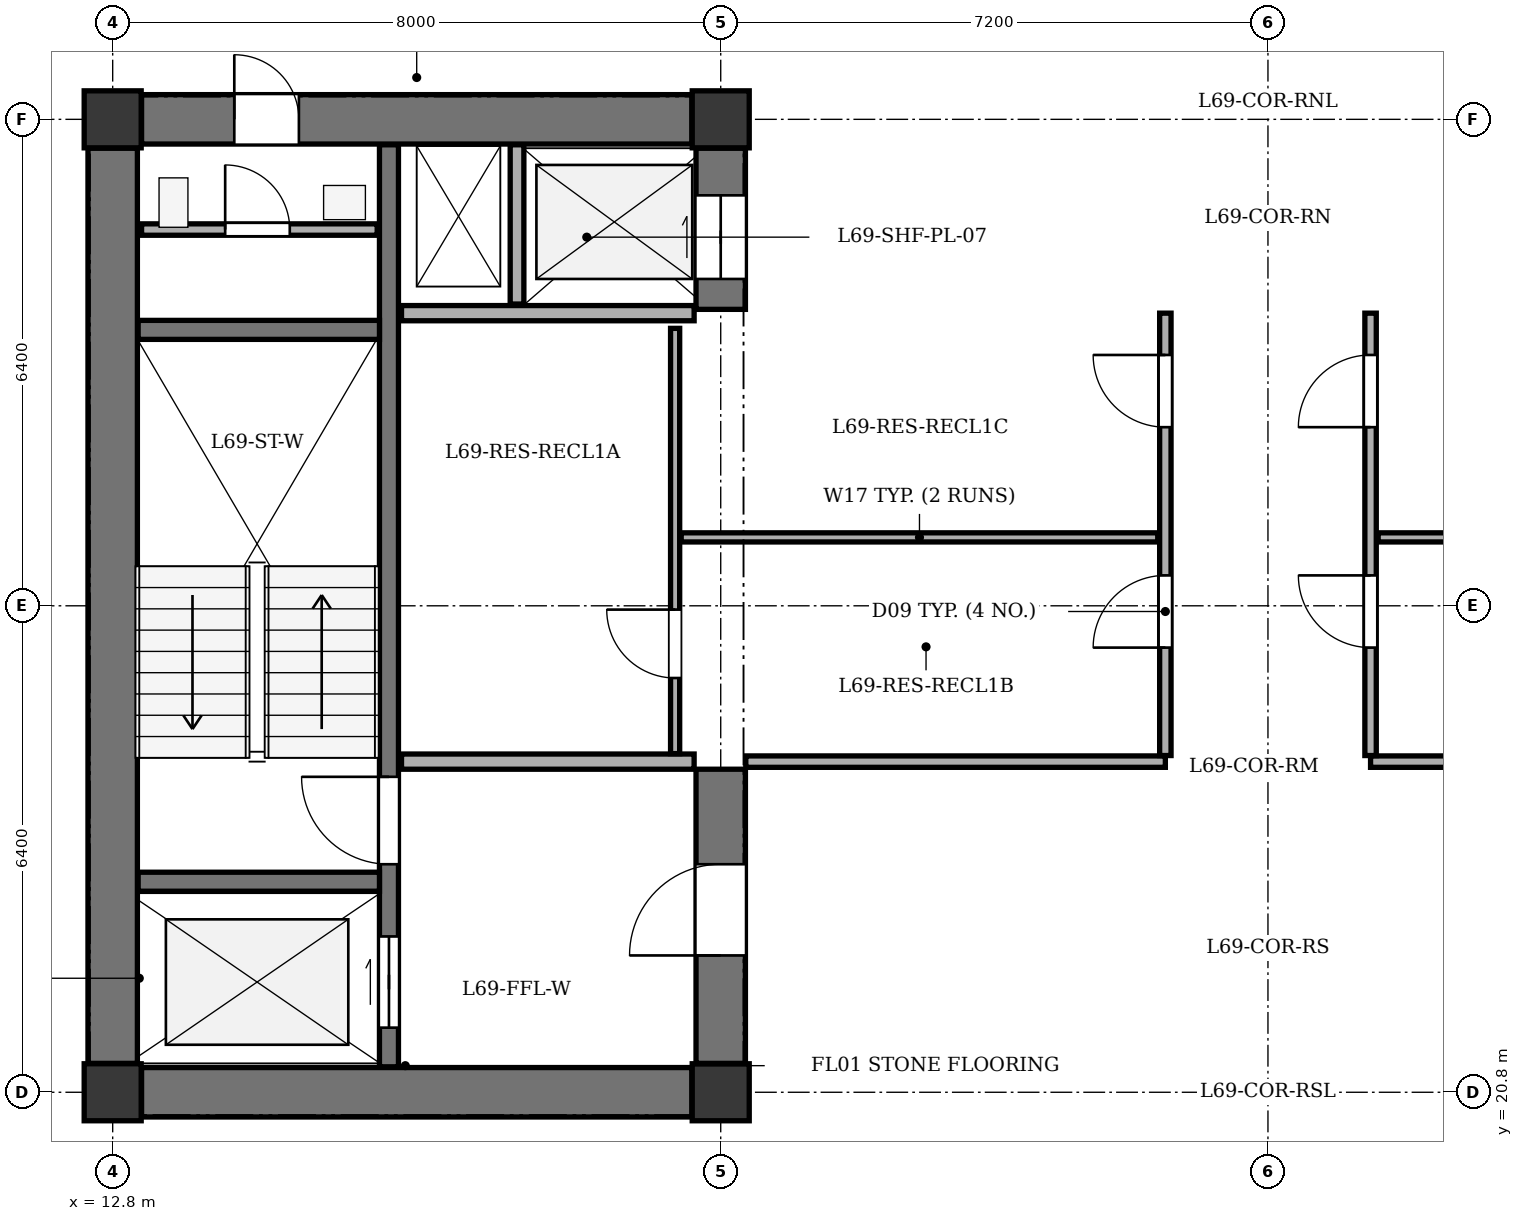
"""IFC4 building model, lengths in metres.
Left out: names, types, materials, properties, quantities, classifications, styles, units other than length and angle.
Written with IfcOpenShell. Run it as: python <this file> out.ifc"""

import sys

from ifc_helpers import new_model, si_unit, direction, frame, frame_2d, origin, origin_2d, place, context, subcontext, project, spatial, rectangle, extrude, element, fill, save


model = new_model("IFC4")
c1 = context("Model", 3, precision=1e-05, world=origin(), true_north=direction((0.0, 1.0)))
c2 = subcontext(c1, "Body", "Model", "MODEL_VIEW")
j1 = project(units=[si_unit("LENGTHUNIT", "METRE"), si_unit("PLANEANGLEUNIT", "RADIAN")], contexts=[c1])
p1 = place(None, origin())
s1 = spatial("IfcSite", under=j1, at=p1, CompositionType="ELEMENT")
p2 = place(p1, origin())
s2 = spatial("IfcBuilding", under=s1, at=p2, CompositionType="ELEMENT")
p3 = place(p2, frame((0.0, 0.0, 261.9)))
s3 = spatial("IfcBuildingStorey", under=s2, at=p3, CompositionType="ELEMENT", Elevation=261.9)
for number, where, z_axis, x_axis in (
    (1, (12.8, 20.8, 0.0), (0.0, 0.0, 1.0), (1.0, 0.0, 0.0)),
    (2, (20.8, 20.8, 0.0), (0.0, 0.0, 1.0), (1.0, 0.0, 0.0)),
    (3, (12.8, 33.6, 0.0), (0.0, 0.0, 1.0), (1.0, 0.0, 0.0)),
    (4, (20.8, 33.6, 0.0), (0.0, 0.0, 1.0), (1.0, 0.0, 0.0)),
):
    element("IfcColumn", number, at=place(p3, frame(where, z_axis=z_axis, x_axis=x_axis)), inside=s3, PredefinedType="COLUMN", context=c2, shape_type="SweptSolid", body=[
        extrude(rectangle(XDim=0.75, YDim=0.75, at=origin_2d()), origin(), (0.0, 0.0, 1.0), 3.4),
    ])
p4 = place(p3, frame((12.8, 21.18, 0.0), z_axis=(0.0, 0.0, 1.0), x_axis=(0.0, 1.0, 0.0)))
e5 = element("IfcWall", 5, at=p4, inside=s3, PredefinedType="SHEAR", context=c2, shape_type="SweptSolid", body=[
    extrude(rectangle(XDim=12.04, YDim=0.65, at=frame_2d((6.02, 0.0))), origin(), (0.0, 0.0, 1.0), 3.1),
])
p5 = place(p3, frame((13.18, 20.8, 0.0), z_axis=(0.0, 0.0, 1.0), x_axis=(1.0, 0.0, 0.0)))
e6 = element("IfcWall", 6, at=p5, inside=s3, PredefinedType="SHEAR", context=c2, shape_type="SweptSolid", body=[
    extrude(rectangle(XDim=7.24, YDim=0.65, at=frame_2d((3.62, 0.0))), origin(), (0.0, 0.0, 1.0), 3.1),
])
p6 = place(p3, frame((13.18, 33.6, 0.0), z_axis=(0.0, 0.0, 1.0), x_axis=(1.0, 0.0, 0.0)))
e7 = element("IfcWall", 7, at=p6, inside=s3, PredefinedType="SHEAR", context=c2, shape_type="SweptSolid", body=[
    extrude(rectangle(XDim=7.24, YDim=0.65, at=frame_2d((3.62, 0.0))), origin(), (0.0, 0.0, 1.0), 3.1),
])
p7 = place(p6, frame((1.22, 0.0, 0.0)))
e8 = element("IfcOpeningElement", 8, at=p7, cuts=e7, PredefinedType="OPENING", context=c2, shape_type="SweptSolid", body=[
    extrude(rectangle(XDim=0.85, YDim=2.02, at=frame_2d((0.425, 1.01))), frame((0.0, 0.335, 0.0), z_axis=(0.0, -1.0, 0.0), x_axis=(1.0, 0.0, 0.0)), (0.0, 0.0, 1.0), 0.67),
])
p8 = place(p3, frame((20.8, 21.18, 0.0), z_axis=(0.0, 0.0, 1.0), x_axis=(0.0, 1.0, 0.0)))
e9 = element("IfcWall", 9, at=p8, inside=s3, PredefinedType="SHEAR", context=c2, shape_type="SweptSolid", body=[
    extrude(rectangle(XDim=3.87, YDim=0.65, at=frame_2d((1.935, 0.0))), origin(), (0.0, 0.0, 1.0), 3.1),
])
p9 = place(p8, frame((1.42, 0.0, 0.0)))
e10 = element("IfcOpeningElement", 10, at=p9, cuts=e9, PredefinedType="OPENING", context=c2, shape_type="SweptSolid", body=[
    extrude(rectangle(XDim=1.2, YDim=2.15, at=frame_2d((0.6, 1.075))), frame((0.0, 0.335, 0.0), z_axis=(0.0, -1.0, 0.0), x_axis=(1.0, 0.0, 0.0)), (0.0, 0.0, 1.0), 0.67),
])
p10 = place(p3, frame((20.8, 31.1, 0.0), z_axis=(0.0, 0.0, 1.0), x_axis=(0.0, 1.0, 0.0)))
e11 = element("IfcWall", 11, at=p10, inside=s3, PredefinedType="SHEAR", context=c2, shape_type="SweptSolid", body=[
    extrude(rectangle(XDim=2.12, YDim=0.65, at=frame_2d((1.06, 0.0))), origin(), (0.0, 0.0, 1.0), 3.1),
])
p11 = place(p10, frame((0.4, 0.0, 0.0)))
e12 = element("IfcOpeningElement", 12, at=p11, cuts=e11, PredefinedType="OPENING", context=c2, shape_type="SweptSolid", body=[
    extrude(rectangle(XDim=1.1, YDim=2.1, at=frame_2d((0.55, 1.05))), frame((0.0, 0.335, 0.0), z_axis=(0.0, -1.0, 0.0), x_axis=(1.0, 0.0, 0.0)), (0.0, 0.0, 1.0), 0.67),
])
p12 = place(p3, frame((16.435, 21.135, 0.0), z_axis=(0.0, 0.0, 1.0), x_axis=(0.0, 1.0, 0.0)))
e13 = element("IfcWall", 13, at=p12, inside=s3, PredefinedType="SHEAR", context=c2, shape_type="SweptSolid", body=[
    extrude(rectangle(XDim=12.13, YDim=0.25, at=frame_2d((6.065, 0.0))), origin(), (0.0, 0.0, 1.0), 3.1),
])
p13 = place(p12, frame((0.515, 0.0, 0.0)))
e14 = element("IfcOpeningElement", 14, at=p13, cuts=e13, PredefinedType="OPENING", context=c2, shape_type="SweptSolid", body=[
    extrude(rectangle(XDim=1.2, YDim=2.15, at=frame_2d((0.6, 1.075))), frame((0.0, 0.135, 0.0), z_axis=(0.0, -1.0, 0.0), x_axis=(1.0, 0.0, 0.0)), (0.0, 0.0, 1.0), 0.27),
])
p14 = place(p12, frame((2.665, 0.0, 0.0)))
e15 = element("IfcOpeningElement", 15, at=p14, cuts=e13, PredefinedType="OPENING", context=c2, shape_type="SweptSolid", body=[
    extrude(rectangle(XDim=1.15, YDim=2.15, at=frame_2d((0.575, 1.075))), frame((0.0, 0.135, 0.0), z_axis=(0.0, -1.0, 0.0), x_axis=(1.0, 0.0, 0.0)), (0.0, 0.0, 1.0), 0.27),
])
for number, where, z_axis, x_axis in (
    (16, (13.135, 23.57, 0.0), (0.0, 0.0, 1.0), (1.0, 0.0, 0.0)),
    (17, (13.135, 30.83, 0.0), (0.0, 0.0, 1.0), (1.0, 0.0, 0.0)),
):
    element("IfcWall", number, at=place(p3, frame(where, z_axis=z_axis, x_axis=x_axis)), inside=s3, PredefinedType="SHEAR", context=c2, shape_type="SweptSolid", body=[
        extrude(rectangle(XDim=3.175, YDim=0.25, at=frame_2d((1.587, 0.0))), origin(), (0.0, 0.0, 1.0), 3.1),
    ])
for number, where, z_axis, x_axis in (
    (18, (16.6, 25.15, 0.0), (0.0, 0.0, 1.0), (1.0, 0.0, 0.0)),
    (19, (16.6, 31.05, 0.0), (0.0, 0.0, 1.0), (1.0, 0.0, 0.0)),
):
    element("IfcWall", number, at=place(p3, frame(where, z_axis=z_axis, x_axis=x_axis)), inside=s3, PredefinedType="SOLIDWALL", context=c2, shape_type="SweptSolid", body=[
        extrude(rectangle(XDim=3.85, YDim=0.2, at=frame_2d((1.925, 0.0))), origin(), (0.0, 0.0, 1.0), 3.1),
    ])
p15 = place(p3, frame((18.12, 31.17, 0.0), z_axis=(0.0, 0.0, 1.0), x_axis=(0.0, 1.0, 0.0)))
e20 = element("IfcWall", 20, at=p15, inside=s3, PredefinedType="PARTITIONING", context=c2, shape_type="SweptSolid", body=[
    extrude(rectangle(XDim=2.095, YDim=0.18, at=frame_2d((1.047, 0.0))), origin(), (0.0, 0.0, 1.0), 3.1),
])
p16 = place(p3, frame((13.18, 32.15, 0.0), z_axis=(0.0, 0.0, 1.0), x_axis=(1.0, 0.0, 0.0)))
e21 = element("IfcWall", 21, at=p16, inside=s3, PredefinedType="PARTITIONING", context=c2, shape_type="SweptSolid", body=[
    extrude(rectangle(XDim=3.1, YDim=0.15, at=frame_2d((1.55, 0.0))), origin(), (0.0, 0.0, 1.0), 3.1),
])
p17 = place(p16, frame((1.1, 0.0, 0.0)))
e22 = element("IfcOpeningElement", 22, at=p17, cuts=e21, PredefinedType="OPENING", context=c2, shape_type="SweptSolid", body=[
    extrude(rectangle(XDim=0.85, YDim=2.02, at=frame_2d((0.425, 1.01))), frame((0.0, 0.085, 0.0), z_axis=(0.0, -1.0, 0.0), x_axis=(1.0, 0.0, 0.0)), (0.0, 0.0, 1.0), 0.17),
])
for number, where, z_axis, x_axis in (
    (23, (21.13, 25.15, 0.0), (0.0, 0.0, 1.0), (1.0, 0.0, 0.0)),
    (24, (29.35, 25.15, 0.0), (0.0, 0.0, 1.0), (1.0, 0.0, 0.0)),
):
    element("IfcWall", number, at=place(p3, frame(where, z_axis=z_axis, x_axis=x_axis)), inside=s3, PredefinedType="PARTITIONING", context=c2, shape_type="SweptSolid", body=[
        extrude(rectangle(XDim=5.52, YDim=0.15, at=frame_2d((2.76, 0.0))), origin(), (0.0, 0.0, 1.0), 3.1),
    ])
p18 = place(p3, frame((26.65, 25.23, 0.0), z_axis=(0.0, 0.0, 1.0), x_axis=(0.0, 1.0, 0.0)))
e25 = element("IfcWall", 25, at=p18, inside=s3, PredefinedType="PARTITIONING", context=c2, shape_type="SweptSolid", body=[
    extrude(rectangle(XDim=5.82, YDim=0.15, at=frame_2d((2.91, 0.0))), origin(), (0.0, 0.0, 1.0), 3.1),
])
p19 = place(p18, frame((1.42, 0.0, 0.0)))
e26 = element("IfcOpeningElement", 26, at=p19, cuts=e25, PredefinedType="OPENING", context=c2, shape_type="SweptSolid", body=[
    extrude(rectangle(XDim=0.95, YDim=2.1, at=frame_2d((0.475, 1.05))), frame((0.0, 0.085, 0.0), z_axis=(0.0, -1.0, 0.0), x_axis=(1.0, 0.0, 0.0)), (0.0, 0.0, 1.0), 0.17),
])
p20 = place(p18, frame((4.32, 0.0, 0.0)))
e27 = element("IfcOpeningElement", 27, at=p20, cuts=e25, PredefinedType="OPENING", context=c2, shape_type="SweptSolid", body=[
    extrude(rectangle(XDim=0.95, YDim=2.1, at=frame_2d((0.475, 1.05))), frame((0.0, 0.085, 0.0), z_axis=(0.0, -1.0, 0.0), x_axis=(1.0, 0.0, 0.0)), (0.0, 0.0, 1.0), 0.17),
])
p21 = place(p3, frame((20.2, 25.255, 0.0), z_axis=(0.0, 0.0, 1.0), x_axis=(0.0, 1.0, 0.0)))
e28 = element("IfcWall", 28, at=p21, inside=s3, PredefinedType="PARTITIONING", context=c2, shape_type="SweptSolid", body=[
    extrude(rectangle(XDim=5.595, YDim=0.12, at=frame_2d((2.798, 0.0))), origin(), (0.0, 0.0, 1.0), 3.1),
])
p22 = place(p21, frame((0.995, 0.0, 0.0)))
e29 = element("IfcOpeningElement", 29, at=p22, cuts=e28, PredefinedType="OPENING", context=c2, shape_type="SweptSolid", body=[
    extrude(rectangle(XDim=0.9, YDim=2.05, at=frame_2d((0.45, 1.025))), frame((0.0, 0.07, 0.0), z_axis=(0.0, -1.0, 0.0), x_axis=(1.0, 0.0, 0.0)), (0.0, 0.0, 1.0), 0.14),
])
p23 = place(p3, frame((20.28, 28.1, 0.0), z_axis=(0.0, 0.0, 1.0), x_axis=(1.0, 0.0, 0.0)))
e30 = element("IfcWall", 30, at=p23, inside=s3, PredefinedType="PARTITIONING", context=c2, shape_type="SweptSolid", body=[
    extrude(rectangle(XDim=6.27, YDim=0.12, at=frame_2d((3.135, 0.0))), origin(), (0.0, 0.0, 1.0), 3.1),
])
p24 = place(p3, frame((29.35, 25.23, 0.0), z_axis=(0.0, 0.0, 1.0), x_axis=(0.0, 1.0, 0.0)))
e31 = element("IfcWall", 31, at=p24, inside=s3, PredefinedType="PARTITIONING", context=c2, shape_type="SweptSolid", body=[
    extrude(rectangle(XDim=5.82, YDim=0.15, at=frame_2d((2.91, 0.0))), origin(), (0.0, 0.0, 1.0), 3.1),
])
p25 = place(p24, frame((1.42, 0.0, 0.0)))
e32 = element("IfcOpeningElement", 32, at=p25, cuts=e31, PredefinedType="OPENING", context=c2, shape_type="SweptSolid", body=[
    extrude(rectangle(XDim=0.95, YDim=2.1, at=frame_2d((0.475, 1.05))), frame((0.0, 0.085, 0.0), z_axis=(0.0, -1.0, 0.0), x_axis=(1.0, 0.0, 0.0)), (0.0, 0.0, 1.0), 0.17),
])
p26 = place(p24, frame((4.32, 0.0, 0.0)))
e33 = element("IfcOpeningElement", 33, at=p26, cuts=e31, PredefinedType="OPENING", context=c2, shape_type="SweptSolid", body=[
    extrude(rectangle(XDim=0.95, YDim=2.1, at=frame_2d((0.475, 1.05))), frame((0.0, 0.085, 0.0), z_axis=(0.0, -1.0, 0.0), x_axis=(1.0, 0.0, 0.0)), (0.0, 0.0, 1.0), 0.17),
])
p27 = place(p3, frame((29.45, 28.1, 0.0), z_axis=(0.0, 0.0, 1.0), x_axis=(1.0, 0.0, 0.0)))
e34 = element("IfcWall", 34, at=p27, inside=s3, PredefinedType="PARTITIONING", context=c2, shape_type="SweptSolid", body=[
    extrude(rectangle(XDim=5.27, YDim=0.12, at=frame_2d((2.635, 0.0))), origin(), (0.0, 0.0, 1.0), 3.1),
])
p28 = place(p7, origin())
e35 = element("IfcDoor", 35, at=p28, inside=s3, OperationType="SINGLE_SWING_LEFT", PredefinedType="DOOR", context=c2, shape_type="SweptSolid", body=[
    extrude(rectangle(XDim=0.85, YDim=2.02, at=frame_2d((0.425, 1.01))), frame((0.0, 0.025, 0.0), z_axis=(0.0, -1.0, 0.0), x_axis=(1.0, 0.0, 0.0)), (0.0, 0.0, 1.0), 0.05),
])
fill(e8, e35)
p29 = place(p9, origin())
e36 = element("IfcDoor", 36, at=p29, inside=s3, OperationType="SINGLE_SWING_LEFT", PredefinedType="DOOR", context=c2, shape_type="SweptSolid", body=[
    extrude(rectangle(XDim=1.2, YDim=2.15, at=frame_2d((0.6, 1.075))), frame((0.0, 0.025, 0.0), z_axis=(0.0, -1.0, 0.0), x_axis=(1.0, 0.0, 0.0)), (0.0, 0.0, 1.0), 0.05),
])
fill(e10, e36)
p30 = place(p11, origin())
e37 = element("IfcDoor", 37, at=p30, inside=s3, OperationType="DOUBLE_DOOR_SLIDING", PredefinedType="DOOR", context=c2, shape_type="SweptSolid", body=[
    extrude(rectangle(XDim=1.1, YDim=2.1, at=frame_2d((0.55, 1.05))), frame((0.0, 0.025, 0.0), z_axis=(0.0, -1.0, 0.0), x_axis=(1.0, 0.0, 0.0)), (0.0, 0.0, 1.0), 0.05),
])
fill(e12, e37)
p31 = place(p13, origin())
e38 = element("IfcDoor", 38, at=p31, inside=s3, OperationType="DOUBLE_DOOR_SLIDING", PredefinedType="DOOR", context=c2, shape_type="SweptSolid", body=[
    extrude(rectangle(XDim=1.2, YDim=2.15, at=frame_2d((0.6, 1.075))), frame((0.0, 0.025, 0.0), z_axis=(0.0, -1.0, 0.0), x_axis=(1.0, 0.0, 0.0)), (0.0, 0.0, 1.0), 0.05),
])
fill(e14, e38)
p32 = place(p14, origin())
e39 = element("IfcDoor", 39, at=p32, inside=s3, OperationType="SINGLE_SWING_RIGHT", PredefinedType="DOOR", context=c2, shape_type="SweptSolid", body=[
    extrude(rectangle(XDim=1.15, YDim=2.15, at=frame_2d((0.575, 1.075))), frame((0.0, 0.025, 0.0), z_axis=(0.0, -1.0, 0.0), x_axis=(1.0, 0.0, 0.0)), (0.0, 0.0, 1.0), 0.05),
])
fill(e15, e39)
p33 = place(p17, origin())
e40 = element("IfcDoor", 40, at=p33, inside=s3, OperationType="SINGLE_SWING_LEFT", PredefinedType="DOOR", context=c2, shape_type="SweptSolid", body=[
    extrude(rectangle(XDim=0.85, YDim=2.02, at=frame_2d((0.425, 1.01))), frame((0.0, 0.025, 0.0), z_axis=(0.0, -1.0, 0.0), x_axis=(1.0, 0.0, 0.0)), (0.0, 0.0, 1.0), 0.05),
])
fill(e22, e40)
p34 = place(p22, origin())
e41 = element("IfcDoor", 41, at=p34, inside=s3, OperationType="SINGLE_SWING_RIGHT", PredefinedType="DOOR", context=c2, shape_type="SweptSolid", body=[
    extrude(rectangle(XDim=0.9, YDim=2.05, at=frame_2d((0.45, 1.025))), frame((0.0, 0.025, 0.0), z_axis=(0.0, -1.0, 0.0), x_axis=(1.0, 0.0, 0.0)), (0.0, 0.0, 1.0), 0.05),
])
fill(e29, e41)
p35 = place(p19, origin())
e42 = element("IfcDoor", 42, at=p35, inside=s3, OperationType="SINGLE_SWING_LEFT", PredefinedType="DOOR", context=c2, shape_type="SweptSolid", body=[
    extrude(rectangle(XDim=0.95, YDim=2.1, at=frame_2d((0.475, 1.05))), frame((0.0, 0.025, 0.0), z_axis=(0.0, -1.0, 0.0), x_axis=(1.0, 0.0, 0.0)), (0.0, 0.0, 1.0), 0.05),
])
fill(e26, e42)
p36 = place(p20, origin())
e43 = element("IfcDoor", 43, at=p36, inside=s3, OperationType="SINGLE_SWING_RIGHT", PredefinedType="DOOR", context=c2, shape_type="SweptSolid", body=[
    extrude(rectangle(XDim=0.95, YDim=2.1, at=frame_2d((0.475, 1.05))), frame((0.0, 0.025, 0.0), z_axis=(0.0, -1.0, 0.0), x_axis=(1.0, 0.0, 0.0)), (0.0, 0.0, 1.0), 0.05),
])
fill(e27, e43)
p37 = place(p25, origin())
e44 = element("IfcDoor", 44, at=p37, inside=s3, OperationType="SINGLE_SWING_RIGHT", PredefinedType="DOOR", context=c2, shape_type="SweptSolid", body=[
    extrude(rectangle(XDim=0.95, YDim=2.1, at=frame_2d((0.475, 1.05))), frame((0.0, 0.025, 0.0), z_axis=(0.0, -1.0, 0.0), x_axis=(1.0, 0.0, 0.0)), (0.0, 0.0, 1.0), 0.05),
])
fill(e32, e44)
p38 = place(p26, origin())
e45 = element("IfcDoor", 45, at=p38, inside=s3, OperationType="SINGLE_SWING_LEFT", PredefinedType="DOOR", context=c2, shape_type="SweptSolid", body=[
    extrude(rectangle(XDim=0.95, YDim=2.1, at=frame_2d((0.475, 1.05))), frame((0.0, 0.025, 0.0), z_axis=(0.0, -1.0, 0.0), x_axis=(1.0, 0.0, 0.0)), (0.0, 0.0, 1.0), 0.05),
])
fill(e33, e45)
save(model, sys.argv[1])
